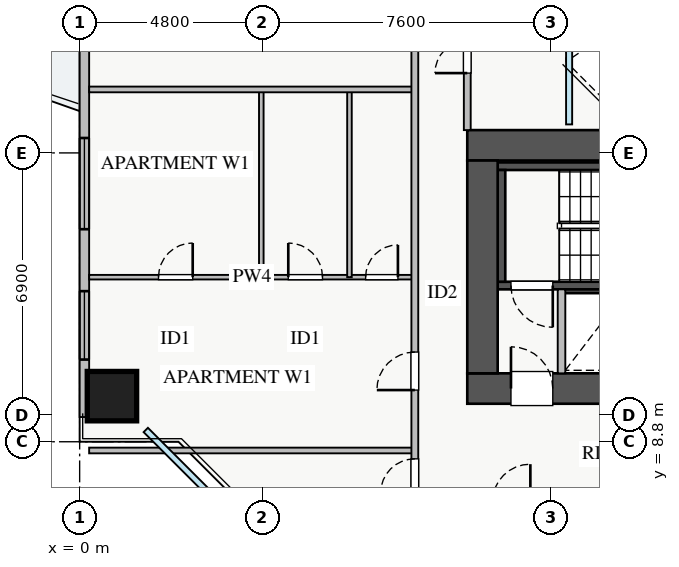
"""IFC4 building model, lengths in metres.
Left out: names, types, materials, properties, quantities, classifications, styles, units other than length and angle.
Written with IfcOpenShell. Run it as: python <this file> out.ifc"""

import sys

from ifc_helpers import new_model, si_unit, direction, frame, frame_2d, origin, origin_2d, place, context, subcontext, project, spatial, rectangle, extrude, source, transform, mapped, element, fill, save


model = new_model("IFC4")
c1 = context("Model", 3, precision=1e-05, world=origin(), true_north=direction((0.0, 1.0)))
c2 = subcontext(c1, "Body", "Model", "MODEL_VIEW")
j1 = project(units=[si_unit("LENGTHUNIT", "METRE"), si_unit("PLANEANGLEUNIT", "RADIAN")], contexts=[c1])
p1 = place(None, origin())
s1 = spatial("IfcSite", under=j1, at=p1, CompositionType="ELEMENT")
p2 = place(p1, origin())
s2 = spatial("IfcBuilding", under=s1, at=p2, CompositionType="ELEMENT")
p3 = place(p2, frame((0.0, 0.0, 56.75)))
s3 = spatial("IfcBuildingStorey", under=s2, at=p3, CompositionType="ELEMENT", Elevation=56.75)
p4 = place(p3, frame((12.68, 12.8, 0.0), z_axis=(0.0, 0.0, 1.0), x_axis=(1.0, 0.0, 0.0)))
e1 = element("IfcWall", 1, at=p4, inside=s3, PredefinedType="SHEAR", context=c2, shape_type="SweptSolid", body=[
    extrude(rectangle(XDim=1.94, YDim=0.18, at=frame_2d((0.97, 0.0))), origin(), (0.0, 0.0, 1.0), 3.07),
])
p5 = place(p3, frame((11.0, 12.91, 0.0), z_axis=(0.0, 0.0, 1.0), x_axis=(1.0, 0.0, 0.0)))
e2 = element("IfcWall", 2, at=p5, inside=s3, PredefinedType="SHEAR", context=c2, shape_type="SweptSolid", body=[
    extrude(rectangle(XDim=7.15, YDim=0.2, at=frame_2d((3.575, 0.0))), origin(), (0.0, 0.0, 1.0), 3.25),
])
p6 = place(p5, frame((0.35, 0.0, 0.0)))
e3 = element("IfcOpeningElement", 3, at=p6, cuts=e2, PredefinedType="OPENING", context=c2, shape_type="SweptSolid", body=[
    extrude(rectangle(XDim=1.1, YDim=2.05, at=frame_2d((0.55, 1.025))), frame((0.0, 0.11, 0.0), z_axis=(0.0, -1.0, 0.0), x_axis=(1.0, 0.0, 0.0)), (0.0, 0.0, 1.0), 0.22),
])
p7 = place(p3, frame((11.0, 16.05, 0.0), z_axis=(0.0, 0.0, 1.0), x_axis=(1.0, 0.0, 0.0)))
e4 = element("IfcWall", 4, at=p7, inside=s3, PredefinedType="SHEAR", context=c2, shape_type="SweptSolid", body=[
    extrude(rectangle(XDim=7.15, YDim=0.2, at=frame_2d((3.575, 0.0))), origin(), (0.0, 0.0, 1.0), 3.25),
])
p8 = place(p3, frame((11.1, 13.01, 0.0), z_axis=(0.0, 0.0, 1.0), x_axis=(0.0, 1.0, 0.0)))
e5 = element("IfcWall", 5, at=p8, inside=s3, PredefinedType="SHEAR", context=c2, shape_type="SweptSolid", body=[
    extrude(rectangle(XDim=2.94, YDim=0.2, at=frame_2d((1.47, 0.0))), origin(), (0.0, 0.0, 1.0), 3.25),
])
p9 = place(p3, frame((10.2, 10.2, 0.0), z_axis=(0.0, 0.0, 1.0), x_axis=(1.0, 0.0, 0.0)))
e6 = element("IfcWall", 6, at=p9, inside=s3, PredefinedType="SHEAR", context=c2, shape_type="SweptSolid", body=[
    extrude(rectangle(XDim=17.6, YDim=0.8, at=frame_2d((8.8, 0.0))), origin(), (0.0, 0.0, 1.0), 3.25),
])
p10 = place(p9, frame((1.15, 0.0, 0.0)))
e7 = element("IfcOpeningElement", 7, at=p10, cuts=e6, PredefinedType="OPENING", context=c2, shape_type="SweptSolid", body=[
    extrude(rectangle(XDim=1.1, YDim=2.05, at=frame_2d((0.55, 1.025))), frame((0.0, 0.41, 0.0), z_axis=(0.0, -1.0, 0.0), x_axis=(1.0, 0.0, 0.0)), (0.0, 0.0, 1.0), 0.82),
])
p11 = place(p9, frame((8.3, 0.0, 0.0)))
e8 = element("IfcOpeningElement", 8, at=p11, cuts=e6, PredefinedType="OPENING", context=c2, shape_type="SweptSolid", body=[
    extrude(rectangle(XDim=1.1, YDim=2.05, at=frame_2d((0.55, 1.025))), frame((0.0, 0.41, 0.0), z_axis=(0.0, -1.0, 0.0), x_axis=(1.0, 0.0, 0.0)), (0.0, 0.0, 1.0), 0.82),
])
p12 = place(p9, frame((10.05, 0.0, 0.0)))
e9 = element("IfcOpeningElement", 9, at=p12, cuts=e6, PredefinedType="OPENING", context=c2, shape_type="SweptSolid", body=[
    extrude(rectangle(XDim=1.1, YDim=2.05, at=frame_2d((0.55, 1.025))), frame((0.0, 0.41, 0.0), z_axis=(0.0, -1.0, 0.0), x_axis=(1.0, 0.0, 0.0)), (0.0, 0.0, 1.0), 0.82),
])
p13 = place(p9, frame((14.74, 0.0, 0.0)))
e10 = element("IfcOpeningElement", 10, at=p13, cuts=e6, PredefinedType="OPENING", context=c2, shape_type="SweptSolid", body=[
    extrude(rectangle(XDim=1.0, YDim=2.05, at=frame_2d((0.5, 1.025))), frame((0.0, 0.41, 0.0), z_axis=(0.0, -1.0, 0.0), x_axis=(1.0, 0.0, 0.0)), (0.0, 0.0, 1.0), 0.82),
])
p14 = place(p9, frame((11.945, 0.0, 0.0)))
e11 = element("IfcOpeningElement", 11, at=p14, cuts=e6, PredefinedType="OPENING", context=c2, shape_type="SweptSolid", body=[
    extrude(rectangle(XDim=1.0, YDim=2.05, at=frame_2d((0.5, 1.025))), frame((0.0, 0.41, 0.0), z_axis=(0.0, -1.0, 0.0), x_axis=(1.0, 0.0, 0.0)), (0.0, 0.0, 1.0), 0.82),
])
p15 = place(p9, frame((13.48, 0.0, 0.0)))
e12 = element("IfcOpeningElement", 12, at=p15, cuts=e6, PredefinedType="OPENING", context=c2, shape_type="SweptSolid", body=[
    extrude(rectangle(XDim=1.0, YDim=2.05, at=frame_2d((0.5, 1.025))), frame((0.0, 0.41, 0.0), z_axis=(0.0, -1.0, 0.0), x_axis=(1.0, 0.0, 0.0)), (0.0, 0.0, 1.0), 0.82),
])
p16 = place(p3, frame((10.2, 16.6, 0.0), z_axis=(0.0, 0.0, 1.0), x_axis=(1.0, 0.0, 0.0)))
e13 = element("IfcWall", 13, at=p16, inside=s3, PredefinedType="SHEAR", context=c2, shape_type="SweptSolid", body=[
    extrude(rectangle(XDim=17.6, YDim=0.8, at=frame_2d((8.8, 0.0))), origin(), (0.0, 0.0, 1.0), 3.25),
])
p17 = place(p3, frame((10.6, 10.6, 0.0), z_axis=(0.0, 0.0, 1.0), x_axis=(0.0, 1.0, 0.0)))
e14 = element("IfcWall", 14, at=p17, inside=s3, PredefinedType="SHEAR", context=c2, shape_type="SweptSolid", body=[
    extrude(rectangle(XDim=5.6, YDim=0.8, at=frame_2d((2.8, 0.0))), origin(), (0.0, 0.0, 1.0), 3.25),
])
m1 = source(origin(), c2, "Body", "SweptSolid", [
    extrude(rectangle(XDim=1.3, YDim=1.3, at=origin_2d()), origin(), (0.0, 0.0, 1.0), 3.25),
])
p18 = place(p3, frame((0.85, 10.0, 0.0), z_axis=(0.0, 0.0, 1.0), x_axis=(1.0, 0.0, 0.0)))
e15 = element("IfcColumn", 15, at=p18, inside=s3, PredefinedType="COLUMN", context=c2, shape_type="MappedRepresentation", body=[
    mapped(m1, transform((0.0, 0.0, 0.0), x_axis=(1.0, 0.0, 0.0), y_axis=(0.0, 1.0, 0.0), z_axis=(0.0, 0.0, 1.0), scale=1.0)),
])
p19 = place(p3, frame((0.125, 9.45, 0.0), z_axis=(0.0, 0.0, 1.0), x_axis=(0.0, 1.0, 0.0)))
e16 = element("IfcWall", 16, at=p19, inside=s3, PredefinedType="STANDARD", context=c2, shape_type="SweptSolid", body=[
    extrude(rectangle(XDim=27.1, YDim=0.25, at=frame_2d((13.55, 0.0))), origin(), (0.0, 0.0, 1.0), 2.61),
])
p20 = place(p19, frame((14.4, 0.0, 0.0)))
e17 = element("IfcOpeningElement", 17, at=p20, cuts=e16, PredefinedType="OPENING", context=c2, shape_type="SweptSolid", body=[
    extrude(rectangle(XDim=1.2, YDim=2.1, at=frame_2d((0.6, 1.05))), frame((0.0, 0.135, 0.0), z_axis=(0.0, -1.0, 0.0), x_axis=(1.0, 0.0, 0.0)), (0.0, 0.0, 1.0), 0.27),
])
p21 = place(p19, frame((1.512, 0.0, 0.9)))
e18 = element("IfcOpeningElement", 18, at=p21, cuts=e16, PredefinedType="OPENING", context=c2, shape_type="SweptSolid", body=[
    extrude(rectangle(XDim=1.8, YDim=1.5, at=frame_2d((0.9, 0.75))), frame((0.0, 0.135, 0.0), z_axis=(0.0, -1.0, 0.0), x_axis=(1.0, 0.0, 0.0)), (0.0, 0.0, 1.0), 0.27),
])
p22 = place(p19, frame((23.272, 0.0, 0.9)))
e19 = element("IfcOpeningElement", 19, at=p22, cuts=e16, PredefinedType="OPENING", context=c2, shape_type="SweptSolid", body=[
    extrude(rectangle(XDim=2.1, YDim=1.5, at=frame_2d((1.05, 0.75))), frame((0.0, 0.135, 0.0), z_axis=(0.0, -1.0, 0.0), x_axis=(1.0, 0.0, 0.0)), (0.0, 0.0, 1.0), 0.27),
])
p23 = place(p19, frame((4.942, 0.0, 0.9)))
e20 = element("IfcOpeningElement", 20, at=p23, cuts=e16, PredefinedType="OPENING", context=c2, shape_type="SweptSolid", body=[
    extrude(rectangle(XDim=2.4, YDim=1.5, at=frame_2d((1.2, 0.75))), frame((0.0, 0.135, 0.0), z_axis=(0.0, -1.0, 0.0), x_axis=(1.0, 0.0, 0.0)), (0.0, 0.0, 1.0), 0.27),
])
p24 = place(p19, frame((18.365, 0.0, 0.9)))
e21 = element("IfcOpeningElement", 21, at=p24, cuts=e16, PredefinedType="OPENING", context=c2, shape_type="SweptSolid", body=[
    extrude(rectangle(XDim=0.9, YDim=1.2, at=frame_2d((0.45, 0.6))), frame((0.0, 0.135, 0.0), z_axis=(0.0, -1.0, 0.0), x_axis=(1.0, 0.0, 0.0)), (0.0, 0.0, 1.0), 0.27),
])
p25 = place(p3, frame((12.68, 10.6, 0.0), z_axis=(0.0, 0.0, 1.0), x_axis=(0.0, 1.0, 0.0)))
e22 = element("IfcWall", 22, at=p25, inside=s3, PredefinedType="PARTITIONING", context=c2, shape_type="SweptSolid", body=[
    extrude(rectangle(XDim=2.21, YDim=0.2, at=frame_2d((1.105, 0.0))), origin(), (0.0, 0.0, 1.0), 3.07),
])
p26 = place(p3, frame((0.25, 8.57, 0.0), z_axis=(0.0, 0.0, 1.0), x_axis=(1.0, 0.0, 0.0)))
e23 = element("IfcWall", 23, at=p26, inside=s3, PredefinedType="PARTITIONING", context=c2, shape_type="SweptSolid", body=[
    extrude(rectangle(XDim=8.57, YDim=0.15, at=frame_2d((4.285, 0.0))), origin(), (0.0, 0.0, 1.0), 3.07),
])
p27 = place(p3, frame((0.25, 13.13, 0.0), z_axis=(0.0, 0.0, 1.0), x_axis=(1.0, 0.0, 0.0)))
e24 = element("IfcWall", 24, at=p27, inside=s3, PredefinedType="PLUMBINGWALL", context=c2, shape_type="SweptSolid", body=[
    extrude(rectangle(XDim=8.57, YDim=0.12, at=frame_2d((4.285, 0.0))), origin(), (0.0, 0.0, 1.0), 3.07),
])
p28 = place(p27, frame((1.825, 0.0, 0.0)))
e25 = element("IfcOpeningElement", 25, at=p28, cuts=e24, PredefinedType="OPENING", context=c2, shape_type="SweptSolid", body=[
    extrude(rectangle(XDim=0.9, YDim=2.05, at=frame_2d((0.45, 1.025))), frame((0.0, 0.07, 0.0), z_axis=(0.0, -1.0, 0.0), x_axis=(1.0, 0.0, 0.0)), (0.0, 0.0, 1.0), 0.14),
])
p29 = place(p27, frame((5.24, 0.0, 0.0)))
e26 = element("IfcOpeningElement", 26, at=p29, cuts=e24, PredefinedType="OPENING", context=c2, shape_type="SweptSolid", body=[
    extrude(rectangle(XDim=0.9, YDim=2.05, at=frame_2d((0.45, 1.025))), frame((0.0, 0.07, 0.0), z_axis=(0.0, -1.0, 0.0), x_axis=(1.0, 0.0, 0.0)), (0.0, 0.0, 1.0), 0.14),
])
p30 = place(p27, frame((7.275, 0.0, 0.0)))
e27 = element("IfcOpeningElement", 27, at=p30, cuts=e24, PredefinedType="OPENING", context=c2, shape_type="SweptSolid", body=[
    extrude(rectangle(XDim=0.85, YDim=2.05, at=frame_2d((0.425, 1.025))), frame((0.0, 0.07, 0.0), z_axis=(0.0, -1.0, 0.0), x_axis=(1.0, 0.0, 0.0)), (0.0, 0.0, 1.0), 0.14),
])
for number, where, z_axis, x_axis in (
    (28, (4.78, 13.13, 0.0), (0.0, 0.0, 1.0), (0.0, 1.0, 0.0)),
    (29, (7.1, 13.13, 0.0), (0.0, 0.0, 1.0), (0.0, 1.0, 0.0)),
):
    element("IfcWall", number, at=place(p3, frame(where, z_axis=z_axis, x_axis=x_axis)), inside=s3, PredefinedType="PLUMBINGWALL", context=c2, shape_type="SweptSolid", body=[
        extrude(rectangle(XDim=4.94, YDim=0.12, at=frame_2d((2.47, 0.0))), origin(), (0.0, 0.0, 1.0), 3.07),
    ])
p31 = place(p3, frame((0.25, 18.07, 0.0), z_axis=(0.0, 0.0, 1.0), x_axis=(1.0, 0.0, 0.0)))
e30 = element("IfcWall", 30, at=p31, inside=s3, PredefinedType="PARTITIONING", context=c2, shape_type="SweptSolid", body=[
    extrude(rectangle(XDim=8.57, YDim=0.15, at=frame_2d((4.285, 0.0))), origin(), (0.0, 0.0, 1.0), 2.715),
])
p32 = place(p3, frame((8.82, 7.21, 0.0), z_axis=(0.0, 0.0, 1.0), x_axis=(0.0, 1.0, 0.0)))
e31 = element("IfcWall", 31, at=p32, inside=s3, PredefinedType="PARTITIONING", context=c2, shape_type="SweptSolid", body=[
    extrude(rectangle(XDim=31.23, YDim=0.18, at=frame_2d((15.615, 0.0))), origin(), (0.0, 0.0, 1.0), 3.07),
])
p33 = place(p32, frame((30.09, 0.0, 0.0)))
e32 = element("IfcOpeningElement", 32, at=p33, cuts=e31, PredefinedType="OPENING", context=c2, shape_type="SweptSolid", body=[
    extrude(rectangle(XDim=0.9, YDim=2.05, at=frame_2d((0.45, 1.025))), frame((0.0, 0.1, 0.0), z_axis=(0.0, -1.0, 0.0), x_axis=(1.0, 0.0, 0.0)), (0.0, 0.0, 1.0), 0.2),
])
p34 = place(p32, frame((0.24, 0.0, 0.0)))
e33 = element("IfcOpeningElement", 33, at=p34, cuts=e31, PredefinedType="OPENING", context=c2, shape_type="SweptSolid", body=[
    extrude(rectangle(XDim=0.9, YDim=2.05, at=frame_2d((0.45, 1.025))), frame((0.0, 0.1, 0.0), z_axis=(0.0, -1.0, 0.0), x_axis=(1.0, 0.0, 0.0)), (0.0, 0.0, 1.0), 0.2),
])
p35 = place(p32, frame((2.95, 0.0, 0.0)))
e34 = element("IfcOpeningElement", 34, at=p35, cuts=e31, PredefinedType="OPENING", context=c2, shape_type="SweptSolid", body=[
    extrude(rectangle(XDim=1.0, YDim=2.05, at=frame_2d((0.5, 1.025))), frame((0.0, 0.1, 0.0), z_axis=(0.0, -1.0, 0.0), x_axis=(1.0, 0.0, 0.0)), (0.0, 0.0, 1.0), 0.2),
])
p36 = place(p32, frame((15.115, 0.0, 0.0)))
e35 = element("IfcOpeningElement", 35, at=p36, cuts=e31, PredefinedType="OPENING", context=c2, shape_type="SweptSolid", body=[
    extrude(rectangle(XDim=1.0, YDim=2.05, at=frame_2d((0.5, 1.025))), frame((0.0, 0.1, 0.0), z_axis=(0.0, -1.0, 0.0), x_axis=(1.0, 0.0, 0.0)), (0.0, 0.0, 1.0), 0.2),
])
p37 = place(p32, frame((21.96, 0.0, 0.0)))
e36 = element("IfcOpeningElement", 36, at=p37, cuts=e31, PredefinedType="OPENING", context=c2, shape_type="SweptSolid", body=[
    extrude(rectangle(XDim=1.0, YDim=2.05, at=frame_2d((0.5, 1.025))), frame((0.0, 0.1, 0.0), z_axis=(0.0, -1.0, 0.0), x_axis=(1.0, 0.0, 0.0)), (0.0, 0.0, 1.0), 0.2),
])
p38 = place(p3, frame((10.2, 17.0, 0.0), z_axis=(0.0, 0.0, 1.0), x_axis=(0.0, 1.0, 0.0)))
e37 = element("IfcWall", 37, at=p38, inside=s3, PredefinedType="PARTITIONING", context=c2, shape_type="SweptSolid", body=[
    extrude(rectangle(XDim=12.0, YDim=0.18, at=frame_2d((6.0, 0.0))), origin(), (0.0, 0.0, 1.0), 3.07),
])
p39 = place(p38, frame((1.5, 0.0, 0.0)))
e38 = element("IfcOpeningElement", 38, at=p39, cuts=e37, PredefinedType="OPENING", context=c2, shape_type="SweptSolid", body=[
    extrude(rectangle(XDim=0.85, YDim=2.05, at=frame_2d((0.425, 1.025))), frame((0.0, 0.1, 0.0), z_axis=(0.0, -1.0, 0.0), x_axis=(1.0, 0.0, 0.0)), (0.0, 0.0, 1.0), 0.2),
])
p40 = place(p38, frame((6.5, 0.0, 0.0)))
e39 = element("IfcOpeningElement", 39, at=p40, cuts=e37, PredefinedType="OPENING", context=c2, shape_type="SweptSolid", body=[
    extrude(rectangle(XDim=1.0, YDim=2.05, at=frame_2d((0.5, 1.025))), frame((0.0, 0.1, 0.0), z_axis=(0.0, -1.0, 0.0), x_axis=(1.0, 0.0, 0.0)), (0.0, 0.0, 1.0), 0.2),
])
m2 = source(origin(), c2, "Body", "SweptSolid", [
    extrude(rectangle(XDim=1.8, YDim=1.5, at=frame_2d((0.9, 0.75))), frame((0.0, 0.03, 0.0), z_axis=(0.0, -1.0, 0.0), x_axis=(1.0, 0.0, 0.0)), (0.0, 0.0, 1.0), 0.06),
])
p41 = place(p21, origin())
e40 = element("IfcWindow", 40, at=p41, inside=s3, PartitioningType="TRIPLE_PANEL_VERTICAL", PredefinedType="WINDOW", context=c2, shape_type="MappedRepresentation", body=[
    mapped(m2, transform((0.0, 0.0, 0.0), x_axis=(1.0, 0.0, 0.0), y_axis=(0.0, 1.0, 0.0), z_axis=(0.0, 0.0, 1.0), scale=1.0)),
])
fill(e18, e40)
m3 = source(origin(), c2, "Body", "SweptSolid", [
    extrude(rectangle(XDim=1.1, YDim=2.05, at=frame_2d((0.55, 1.025))), frame((0.0, 0.025, 0.0), z_axis=(0.0, -1.0, 0.0), x_axis=(1.0, 0.0, 0.0)), (0.0, 0.0, 1.0), 0.05),
])
p42 = place(p10, origin())
e41 = element("IfcDoor", 41, at=p42, inside=s3, OperationType="SINGLE_SWING_LEFT", PredefinedType="DOOR", context=c2, shape_type="MappedRepresentation", body=[
    mapped(m3, transform((0.0, 0.0, 0.0), x_axis=(1.0, 0.0, 0.0), y_axis=(0.0, 1.0, 0.0), z_axis=(0.0, 0.0, 1.0), scale=1.0)),
])
fill(e7, e41)
p43 = place(p6, frame((1.1, 0.0, 0.0), z_axis=(0.0, 0.0, 1.0), x_axis=(-1.0, 0.0, 0.0)))
e42 = element("IfcDoor", 42, at=p43, inside=s3, OperationType="SINGLE_SWING_RIGHT", PredefinedType="DOOR", context=c2, shape_type="MappedRepresentation", body=[
    mapped(m3, transform((0.0, 0.0, 0.0), x_axis=(1.0, 0.0, 0.0), y_axis=(0.0, 1.0, 0.0), z_axis=(0.0, 0.0, 1.0), scale=1.0)),
])
fill(e3, e42)
m4 = source(origin(), c2, "Body", "SweptSolid", [
    extrude(rectangle(XDim=0.9, YDim=2.05, at=frame_2d((0.45, 1.025))), frame((0.0, 0.025, 0.0), z_axis=(0.0, -1.0, 0.0), x_axis=(1.0, 0.0, 0.0)), (0.0, 0.0, 1.0), 0.05),
])
p44 = place(p28, origin())
e43 = element("IfcDoor", 43, at=p44, inside=s3, OperationType="SINGLE_SWING_RIGHT", PredefinedType="DOOR", context=c2, shape_type="MappedRepresentation", body=[
    mapped(m4, transform((0.0, 0.0, 0.0), x_axis=(1.0, 0.0, 0.0), y_axis=(0.0, 1.0, 0.0), z_axis=(0.0, 0.0, 1.0), scale=1.0)),
])
fill(e25, e43)
p45 = place(p29, origin())
e44 = element("IfcDoor", 44, at=p45, inside=s3, OperationType="SINGLE_SWING_LEFT", PredefinedType="DOOR", context=c2, shape_type="MappedRepresentation", body=[
    mapped(m4, transform((0.0, 0.0, 0.0), x_axis=(1.0, 0.0, 0.0), y_axis=(0.0, 1.0, 0.0), z_axis=(0.0, 0.0, 1.0), scale=1.0)),
])
fill(e26, e44)
m5 = source(origin(), c2, "Body", "SweptSolid", [
    extrude(rectangle(XDim=0.85, YDim=2.05, at=frame_2d((0.425, 1.025))), frame((0.0, 0.025, 0.0), z_axis=(0.0, -1.0, 0.0), x_axis=(1.0, 0.0, 0.0)), (0.0, 0.0, 1.0), 0.05),
])
p46 = place(p30, origin())
e45 = element("IfcDoor", 45, at=p46, inside=s3, OperationType="SINGLE_SWING_RIGHT", PredefinedType="DOOR", context=c2, shape_type="MappedRepresentation", body=[
    mapped(m5, transform((0.0, 0.0, 0.0), x_axis=(1.0, 0.0, 0.0), y_axis=(0.0, 1.0, 0.0), z_axis=(0.0, 0.0, 1.0), scale=1.0)),
])
fill(e27, e45)
p47 = place(p34, origin())
e46 = element("IfcDoor", 46, at=p47, inside=s3, OperationType="SINGLE_SWING_LEFT", PredefinedType="DOOR", context=c2, shape_type="MappedRepresentation", body=[
    mapped(m4, transform((0.0, 0.0, 0.0), x_axis=(1.0, 0.0, 0.0), y_axis=(0.0, 1.0, 0.0), z_axis=(0.0, 0.0, 1.0), scale=1.0)),
])
fill(e33, e46)
m6 = source(origin(), c2, "Body", "SweptSolid", [
    extrude(rectangle(XDim=1.0, YDim=2.05, at=frame_2d((0.5, 1.025))), frame((0.0, 0.025, 0.0), z_axis=(0.0, -1.0, 0.0), x_axis=(1.0, 0.0, 0.0)), (0.0, 0.0, 1.0), 0.05),
])
p48 = place(p35, origin())
e47 = element("IfcDoor", 47, at=p48, inside=s3, OperationType="SINGLE_SWING_LEFT", PredefinedType="DOOR", context=c2, shape_type="MappedRepresentation", body=[
    mapped(m6, transform((0.0, 0.0, 0.0), x_axis=(1.0, 0.0, 0.0), y_axis=(0.0, 1.0, 0.0), z_axis=(0.0, 0.0, 1.0), scale=1.0)),
])
fill(e34, e47)
p49 = place(p39, origin())
e48 = element("IfcDoor", 48, at=p49, inside=s3, OperationType="SINGLE_SWING_LEFT", PredefinedType="DOOR", context=c2, shape_type="MappedRepresentation", body=[
    mapped(m5, transform((0.0, 0.0, 0.0), x_axis=(1.0, 0.0, 0.0), y_axis=(0.0, 1.0, 0.0), z_axis=(0.0, 0.0, 1.0), scale=1.0)),
])
fill(e38, e48)
m7 = source(origin(), c2, "Body", "SweptSolid", [
    extrude(rectangle(XDim=2.4, YDim=1.5, at=frame_2d((1.2, 0.75))), frame((0.0, 0.03, 0.0), z_axis=(0.0, -1.0, 0.0), x_axis=(1.0, 0.0, 0.0)), (0.0, 0.0, 1.0), 0.06),
])
p50 = place(p23, origin())
e49 = element("IfcWindow", 49, at=p50, inside=s3, PartitioningType="TRIPLE_PANEL_VERTICAL", PredefinedType="WINDOW", context=c2, shape_type="MappedRepresentation", body=[
    mapped(m7, transform((0.0, 0.0, 0.0), x_axis=(1.0, 0.0, 0.0), y_axis=(0.0, 1.0, 0.0), z_axis=(0.0, 0.0, 1.0), scale=1.0)),
])
fill(e20, e49)
save(model, sys.argv[1])
